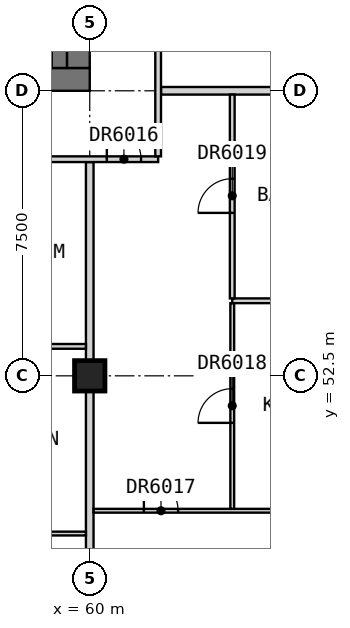
"""IFC4 building model, lengths in metres.
Left out: names, types, materials, properties, quantities, classifications, styles, units other than length and angle.
Written with IfcOpenShell. Run it as: python <this file> out.ifc"""

import sys

from ifc_helpers import new_model, si_unit, direction, frame, frame_2d, origin, origin_2d, place, context, subcontext, project, spatial, rectangle, extrude, element, fill, save


model = new_model("IFC4")
c1 = context("Model", 3, precision=1e-05, world=origin(), true_north=direction((0.0, 1.0)))
c2 = subcontext(c1, "Body", "Model", "MODEL_VIEW")
j1 = project(units=[si_unit("LENGTHUNIT", "METRE"), si_unit("PLANEANGLEUNIT", "RADIAN")], contexts=[c1])
p1 = place(None, origin())
s1 = spatial("IfcSite", under=j1, at=p1, CompositionType="ELEMENT")
p2 = place(p1, origin())
s2 = spatial("IfcBuilding", under=s1, at=p2, CompositionType="ELEMENT")
p3 = place(p2, frame((0.0, 0.0, 226.7)))
s3 = spatial("IfcBuildingStorey", under=s2, at=p3, CompositionType="ELEMENT", Elevation=226.7)
p4 = place(p3, frame((60.0, 52.5, 0.0), z_axis=(0.0, 0.0, 1.0), x_axis=(1.0, 0.0, 0.0)))
e1 = element("IfcColumn", 1, at=p4, inside=s3, PredefinedType="COLUMN", context=c2, shape_type="SweptSolid", body=[
    extrude(rectangle(XDim=0.8, YDim=0.8, at=origin_2d()), origin(), (0.0, 0.0, 1.0), 3.5),
])
p5 = place(p3, frame((30.0, 60.3, 0.0), z_axis=(0.0, 0.0, 1.0), x_axis=(1.0, 0.0, 0.0)))
e2 = element("IfcWall", 2, at=p5, inside=s3, PredefinedType="SHEAR", context=c2, shape_type="SweptSolid", body=[
    extrude(rectangle(XDim=30.0, YDim=0.6, at=frame_2d((15.0, 0.0))), origin(), (0.0, 0.0, 1.0), 3.5),
])
p6 = place(p5, frame((21.9, 0.0, 0.0)))
e3 = element("IfcOpeningElement", 3, at=p6, cuts=e2, PredefinedType="OPENING", context=c2, shape_type="SweptSolid", body=[
    extrude(rectangle(XDim=1.8, YDim=2.1, at=frame_2d((0.9, 1.05))), frame((0.0, 0.31, 0.0), z_axis=(0.0, -1.0, 0.0), x_axis=(1.0, 0.0, 0.0)), (0.0, 0.0, 1.0), 0.62),
])
p7 = place(p5, frame((26.5, 0.0, 0.0)))
e4 = element("IfcOpeningElement", 4, at=p7, cuts=e2, PredefinedType="OPENING", context=c2, shape_type="SweptSolid", body=[
    extrude(rectangle(XDim=1.2, YDim=2.1, at=frame_2d((0.6, 1.05))), frame((0.0, 0.31, 0.0), z_axis=(0.0, -1.0, 0.0), x_axis=(1.0, 0.0, 0.0)), (0.0, 0.0, 1.0), 0.62),
])
p8 = place(p3, frame((59.7, 60.6, 0.0), z_axis=(0.0, 0.0, 1.0), x_axis=(0.0, 1.0, 0.0)))
e5 = element("IfcWall", 5, at=p8, inside=s3, PredefinedType="SHEAR", context=c2, shape_type="SweptSolid", body=[
    extrude(rectangle(XDim=21.3, YDim=0.6, at=frame_2d((10.65, 0.0))), origin(), (0.0, 0.0, 1.0), 3.5),
])
p9 = place(p8, frame((14.9, 0.0, 0.0)))
e6 = element("IfcOpeningElement", 6, at=p9, cuts=e5, PredefinedType="OPENING", context=c2, shape_type="SweptSolid", body=[
    extrude(rectangle(XDim=1.8, YDim=2.1, at=frame_2d((0.9, 1.05))), frame((0.0, 0.31, 0.0), z_axis=(0.0, -1.0, 0.0), x_axis=(1.0, 0.0, 0.0)), (0.0, 0.0, 1.0), 0.62),
])
p10 = place(p3, frame((59.2, 60.6, 0.0), z_axis=(0.0, 0.0, 1.0), x_axis=(0.0, 1.0, 0.0)))
e7 = element("IfcWall", 7, at=p10, inside=s3, PredefinedType="SOLIDWALL", context=c2, shape_type="SweptSolid", body=[
    extrude(rectangle(XDim=7.9, YDim=0.4, at=frame_2d((3.95, 0.0))), origin(), (0.0, 0.0, 1.0), 3.25),
])
for number, where, z_axis, x_axis in (
    (8, (61.875, 60.0, 0.0), (0.0, 0.0, 1.0), (1.0, 0.0, 0.0)),
    (9, (60.0, 41.25, 0.0), (0.0, 0.0, 1.0), (0.0, 1.0, 0.0)),
):
    element("IfcWall", number, at=place(p3, frame(where, z_axis=z_axis, x_axis=x_axis)), inside=s3, PredefinedType="PARTITIONING", context=c2, shape_type="SweptSolid", body=[
        extrude(rectangle(XDim=16.875, YDim=0.2, at=frame_2d((8.438, 0.0))), origin(), (0.0, 0.0, 1.0), 3.25),
    ])
p11 = place(p3, frame((33.75, 58.2, 0.0), z_axis=(0.0, 0.0, 1.0), x_axis=(1.0, 0.0, 0.0)))
e10 = element("IfcWall", 10, at=p11, inside=s3, PredefinedType="PARTITIONING", context=c2, shape_type="SweptSolid", body=[
    extrude(rectangle(XDim=28.05, YDim=0.15, at=frame_2d((14.025, 0.0))), origin(), (0.0, 0.0, 1.0), 3.25),
])
p12 = place(p11, frame((1.375, 0.0, 0.0)))
e11 = element("IfcOpeningElement", 11, at=p12, cuts=e10, PredefinedType="OPENING", context=c2, shape_type="SweptSolid", body=[
    extrude(rectangle(XDim=1.0, YDim=2.1, at=frame_2d((0.5, 1.05))), frame((0.0, 0.085, 0.0), z_axis=(0.0, -1.0, 0.0), x_axis=(1.0, 0.0, 0.0)), (0.0, 0.0, 1.0), 0.17),
])
p13 = place(p11, frame((5.175, 0.0, 0.0)))
e12 = element("IfcOpeningElement", 12, at=p13, cuts=e10, PredefinedType="OPENING", context=c2, shape_type="SweptSolid", body=[
    extrude(rectangle(XDim=0.9, YDim=2.1, at=frame_2d((0.45, 1.05))), frame((0.0, 0.085, 0.0), z_axis=(0.0, -1.0, 0.0), x_axis=(1.0, 0.0, 0.0)), (0.0, 0.0, 1.0), 0.17),
])
p14 = place(p11, frame((12.675, 0.0, 0.0)))
e13 = element("IfcOpeningElement", 13, at=p14, cuts=e10, PredefinedType="OPENING", context=c2, shape_type="SweptSolid", body=[
    extrude(rectangle(XDim=0.9, YDim=2.1, at=frame_2d((0.45, 1.05))), frame((0.0, 0.085, 0.0), z_axis=(0.0, -1.0, 0.0), x_axis=(1.0, 0.0, 0.0)), (0.0, 0.0, 1.0), 0.17),
])
p15 = place(p11, frame((20.175, 0.0, 0.0)))
e14 = element("IfcOpeningElement", 14, at=p15, cuts=e10, PredefinedType="OPENING", context=c2, shape_type="SweptSolid", body=[
    extrude(rectangle(XDim=0.9, YDim=2.1, at=frame_2d((0.45, 1.05))), frame((0.0, 0.085, 0.0), z_axis=(0.0, -1.0, 0.0), x_axis=(1.0, 0.0, 0.0)), (0.0, 0.0, 1.0), 0.17),
])
p16 = place(p11, frame((26.7, 0.0, 0.0)))
e15 = element("IfcOpeningElement", 15, at=p16, cuts=e10, PredefinedType="OPENING", context=c2, shape_type="SweptSolid", body=[
    extrude(rectangle(XDim=0.9, YDim=2.1, at=frame_2d((0.45, 1.05))), frame((0.0, 0.085, 0.0), z_axis=(0.0, -1.0, 0.0), x_axis=(1.0, 0.0, 0.0)), (0.0, 0.0, 1.0), 0.17),
])
p17 = place(p3, frame((61.8, 58.275, 0.0), z_axis=(0.0, 0.0, 1.0), x_axis=(0.0, 1.0, 0.0)))
e16 = element("IfcWall", 16, at=p17, inside=s3, PredefinedType="PARTITIONING", context=c2, shape_type="SweptSolid", body=[
    extrude(rectangle(XDim=25.95, YDim=0.15, at=frame_2d((12.975, 0.0))), origin(), (0.0, 0.0, 1.0), 3.25),
])
p18 = place(p17, frame((4.575, 0.0, 0.0)))
e17 = element("IfcOpeningElement", 17, at=p18, cuts=e16, PredefinedType="OPENING", context=c2, shape_type="SweptSolid", body=[
    extrude(rectangle(XDim=1.8, YDim=2.1, at=frame_2d((0.9, 1.05))), frame((0.0, 0.085, 0.0), z_axis=(0.0, -1.0, 0.0), x_axis=(1.0, 0.0, 0.0)), (0.0, 0.0, 1.0), 0.17),
])
p19 = place(p17, frame((10.65, 0.0, 0.0)))
e18 = element("IfcOpeningElement", 18, at=p19, cuts=e16, PredefinedType="OPENING", context=c2, shape_type="SweptSolid", body=[
    extrude(rectangle(XDim=0.9, YDim=2.1, at=frame_2d((0.45, 1.05))), frame((0.0, 0.085, 0.0), z_axis=(0.0, -1.0, 0.0), x_axis=(1.0, 0.0, 0.0)), (0.0, 0.0, 1.0), 0.17),
])
p20 = place(p17, frame((18.15, 0.0, 0.0)))
e19 = element("IfcOpeningElement", 19, at=p20, cuts=e16, PredefinedType="OPENING", context=c2, shape_type="SweptSolid", body=[
    extrude(rectangle(XDim=0.9, YDim=2.1, at=frame_2d((0.45, 1.05))), frame((0.0, 0.085, 0.0), z_axis=(0.0, -1.0, 0.0), x_axis=(1.0, 0.0, 0.0)), (0.0, 0.0, 1.0), 0.17),
])
p21 = place(p3, frame((37.6, 48.35, 0.0), z_axis=(0.0, 0.0, 1.0), x_axis=(1.0, 0.0, 0.0)))
e20 = element("IfcWall", 20, at=p21, inside=s3, PredefinedType="PARTITIONING", context=c2, shape_type="SweptSolid", body=[
    extrude(rectangle(XDim=22.3, YDim=0.1, at=frame_2d((11.15, 0.0))), origin(), (0.0, 0.0, 1.0), 3.25),
])
p22 = place(p21, frame((1.325, 0.0, 0.0)))
e21 = element("IfcOpeningElement", 21, at=p22, cuts=e20, PredefinedType="OPENING", context=c2, shape_type="SweptSolid", body=[
    extrude(rectangle(XDim=0.9, YDim=2.1, at=frame_2d((0.45, 1.05))), frame((0.0, 0.06, 0.0), z_axis=(0.0, -1.0, 0.0), x_axis=(1.0, 0.0, 0.0)), (0.0, 0.0, 1.0), 0.12),
])
p23 = place(p21, frame((8.825, 0.0, 0.0)))
e22 = element("IfcOpeningElement", 22, at=p23, cuts=e20, PredefinedType="OPENING", context=c2, shape_type="SweptSolid", body=[
    extrude(rectangle(XDim=0.9, YDim=2.1, at=frame_2d((0.45, 1.05))), frame((0.0, 0.06, 0.0), z_axis=(0.0, -1.0, 0.0), x_axis=(1.0, 0.0, 0.0)), (0.0, 0.0, 1.0), 0.12),
])
p24 = place(p21, frame((16.325, 0.0, 0.0)))
e23 = element("IfcOpeningElement", 23, at=p24, cuts=e20, PredefinedType="OPENING", context=c2, shape_type="SweptSolid", body=[
    extrude(rectangle(XDim=0.9, YDim=2.1, at=frame_2d((0.45, 1.05))), frame((0.0, 0.06, 0.0), z_axis=(0.0, -1.0, 0.0), x_axis=(1.0, 0.0, 0.0)), (0.0, 0.0, 1.0), 0.12),
])
p25 = place(p3, frame((60.1, 48.95, 0.0), z_axis=(0.0, 0.0, 1.0), x_axis=(1.0, 0.0, 0.0)))
e24 = element("IfcWall", 24, at=p25, inside=s3, PredefinedType="PARTITIONING", context=c2, shape_type="SweptSolid", body=[
    extrude(rectangle(XDim=17.84, YDim=0.1, at=frame_2d((8.92, 0.0))), origin(), (0.0, 0.0, 1.0), 3.25),
])
p26 = place(p25, frame((1.325, 0.0, 0.0)))
e25 = element("IfcOpeningElement", 25, at=p26, cuts=e24, PredefinedType="OPENING", context=c2, shape_type="SweptSolid", body=[
    extrude(rectangle(XDim=0.9, YDim=2.1, at=frame_2d((0.45, 1.05))), frame((0.0, 0.06, 0.0), z_axis=(0.0, -1.0, 0.0), x_axis=(1.0, 0.0, 0.0)), (0.0, 0.0, 1.0), 0.12),
])
p27 = place(p25, frame((8.475, 0.0, 0.0)))
e26 = element("IfcOpeningElement", 26, at=p27, cuts=e24, PredefinedType="OPENING", context=c2, shape_type="SweptSolid", body=[
    extrude(rectangle(XDim=0.9, YDim=2.1, at=frame_2d((0.45, 1.05))), frame((0.0, 0.06, 0.0), z_axis=(0.0, -1.0, 0.0), x_axis=(1.0, 0.0, 0.0)), (0.0, 0.0, 1.0), 0.12),
])
p28 = place(p25, frame((13.725, 0.0, 0.0)))
e27 = element("IfcOpeningElement", 27, at=p28, cuts=e24, PredefinedType="OPENING", context=c2, shape_type="SweptSolid", body=[
    extrude(rectangle(XDim=0.9, YDim=2.1, at=frame_2d((0.45, 1.05))), frame((0.0, 0.06, 0.0), z_axis=(0.0, -1.0, 0.0), x_axis=(1.0, 0.0, 0.0)), (0.0, 0.0, 1.0), 0.12),
])
p29 = place(p25, frame((16.325, 0.0, 0.0)))
e28 = element("IfcOpeningElement", 28, at=p29, cuts=e24, PredefinedType="OPENING", context=c2, shape_type="SweptSolid", body=[
    extrude(rectangle(XDim=0.9, YDim=2.1, at=frame_2d((0.45, 1.05))), frame((0.0, 0.06, 0.0), z_axis=(0.0, -1.0, 0.0), x_axis=(1.0, 0.0, 0.0)), (0.0, 0.0, 1.0), 0.12),
])
p30 = place(p3, frame((63.75, 49.0, 0.0), z_axis=(0.0, 0.0, 1.0), x_axis=(0.0, 1.0, 0.0)))
e29 = element("IfcWall", 29, at=p30, inside=s3, PredefinedType="PARTITIONING", context=c2, shape_type="SweptSolid", body=[
    extrude(rectangle(XDim=5.413, YDim=0.1, at=frame_2d((2.706, 0.0))), origin(), (0.0, 0.0, 1.0), 3.25),
])
p31 = place(p30, frame((2.262, 0.0, 0.0)))
e30 = element("IfcOpeningElement", 30, at=p31, cuts=e29, PredefinedType="OPENING", context=c2, shape_type="SweptSolid", body=[
    extrude(rectangle(XDim=0.9, YDim=2.1, at=frame_2d((0.45, 1.05))), frame((0.0, 0.06, 0.0), z_axis=(0.0, -1.0, 0.0), x_axis=(1.0, 0.0, 0.0)), (0.0, 0.0, 1.0), 0.12),
])
p32 = place(p3, frame((56.25, 53.275, 0.0), z_axis=(0.0, 0.0, 1.0), x_axis=(1.0, 0.0, 0.0)))
e31 = element("IfcWall", 31, at=p32, inside=s3, PredefinedType="PARTITIONING", context=c2, shape_type="SweptSolid", body=[
    extrude(rectangle(XDim=3.65, YDim=0.125, at=frame_2d((1.825, 0.0))), origin(), (0.0, 0.0, 1.0), 3.25),
])
p33 = place(p3, frame((63.75, 54.475, 0.0), z_axis=(0.0, 0.0, 1.0), x_axis=(1.0, 0.0, 0.0)))
e32 = element("IfcWall", 32, at=p33, inside=s3, PredefinedType="PARTITIONING", context=c2, shape_type="SweptSolid", body=[
    extrude(rectangle(XDim=3.75, YDim=0.125, at=frame_2d((1.875, 0.0))), origin(), (0.0, 0.0, 1.0), 3.25),
])
p34 = place(p3, frame((63.75, 54.538, 0.0), z_axis=(0.0, 0.0, 1.0), x_axis=(0.0, 1.0, 0.0)))
e33 = element("IfcWall", 33, at=p34, inside=s3, PredefinedType="PARTITIONING", context=c2, shape_type="SweptSolid", body=[
    extrude(rectangle(XDim=5.362, YDim=0.125, at=frame_2d((2.681, 0.0))), origin(), (0.0, 0.0, 1.0), 3.25),
])
p35 = place(p34, frame((2.25, 0.0, 0.0)))
e34 = element("IfcOpeningElement", 34, at=p35, cuts=e33, PredefinedType="OPENING", context=c2, shape_type="SweptSolid", body=[
    extrude(rectangle(XDim=0.9, YDim=2.1, at=frame_2d((0.45, 1.05))), frame((0.0, 0.073, 0.0), z_axis=(0.0, -1.0, 0.0), x_axis=(1.0, 0.0, 0.0)), (0.0, 0.0, 1.0), 0.145),
])
p36 = place(p16, origin())
e35 = element("IfcDoor", 35, at=p36, inside=s3, OperationType="SINGLE_SWING_RIGHT", PredefinedType="DOOR", context=c2, shape_type="SweptSolid", body=[
    extrude(rectangle(XDim=0.9, YDim=2.1, at=frame_2d((0.45, 1.05))), frame((0.0, 0.025, 0.0), z_axis=(0.0, -1.0, 0.0), x_axis=(1.0, 0.0, 0.0)), (0.0, 0.0, 1.0), 0.05),
])
fill(e15, e35)
p37 = place(p26, origin())
e36 = element("IfcDoor", 36, at=p37, inside=s3, OperationType="SINGLE_SWING_LEFT", PredefinedType="DOOR", context=c2, shape_type="SweptSolid", body=[
    extrude(rectangle(XDim=0.9, YDim=2.1, at=frame_2d((0.45, 1.05))), frame((0.0, 0.025, 0.0), z_axis=(0.0, -1.0, 0.0), x_axis=(1.0, 0.0, 0.0)), (0.0, 0.0, 1.0), 0.05),
])
fill(e25, e36)
p38 = place(p31, origin())
e37 = element("IfcDoor", 37, at=p38, inside=s3, OperationType="SINGLE_SWING_RIGHT", PredefinedType="DOOR", context=c2, shape_type="SweptSolid", body=[
    extrude(rectangle(XDim=0.9, YDim=2.1, at=frame_2d((0.45, 1.05))), frame((0.0, 0.025, 0.0), z_axis=(0.0, -1.0, 0.0), x_axis=(1.0, 0.0, 0.0)), (0.0, 0.0, 1.0), 0.05),
])
fill(e30, e37)
p39 = place(p35, origin())
e38 = element("IfcDoor", 38, at=p39, inside=s3, OperationType="SINGLE_SWING_RIGHT", PredefinedType="DOOR", context=c2, shape_type="SweptSolid", body=[
    extrude(rectangle(XDim=0.9, YDim=2.1, at=frame_2d((0.45, 1.05))), frame((0.0, 0.025, 0.0), z_axis=(0.0, -1.0, 0.0), x_axis=(1.0, 0.0, 0.0)), (0.0, 0.0, 1.0), 0.05),
])
fill(e34, e38)
save(model, sys.argv[1])
